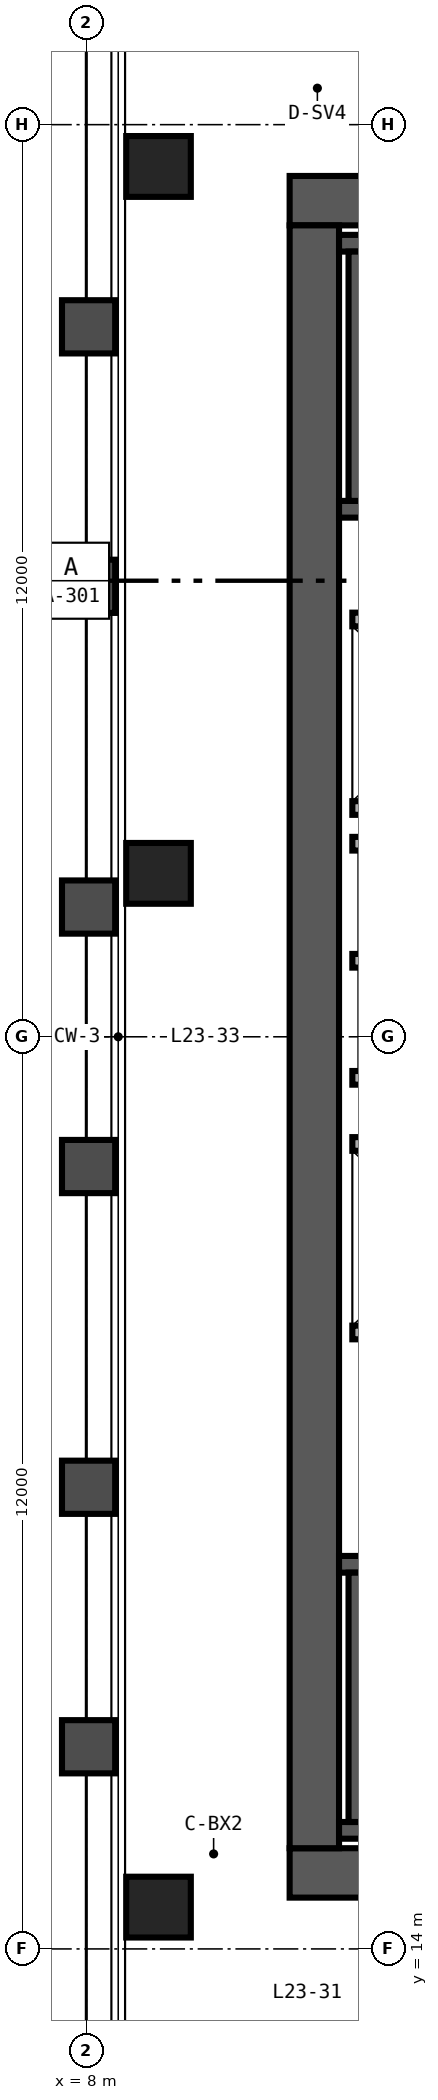
"""IFC4 building model, lengths in metres.
Left out: names, types, materials, properties, quantities, classifications, styles, units other than length and angle.
Written with IfcOpenShell. Run it as: python <this file> out.ifc"""

import sys

from ifc_helpers import new_model, si_unit, direction, frame, frame_2d, origin, origin_2d, place, context, subcontext, project, spatial, rectangle, hollow_rectangle, extrude, source, transform, mapped, element, save


model = new_model("IFC4")
c1 = context("Model", 3, precision=1e-05, world=origin(), true_north=direction((0.0, 1.0)))
c2 = subcontext(c1, "Body", "Model", "MODEL_VIEW")
j1 = project(units=[si_unit("LENGTHUNIT", "METRE"), si_unit("PLANEANGLEUNIT", "RADIAN")], contexts=[c1])
p1 = place(None, origin())
s1 = spatial("IfcSite", under=j1, at=p1, CompositionType="ELEMENT")
p2 = place(p1, origin())
s2 = spatial("IfcBuilding", under=s1, at=p2, CompositionType="ELEMENT")
p3 = place(p2, frame((0.0, 0.0, 97.2)))
s3 = spatial("IfcBuildingStorey", under=s2, at=p3, CompositionType="ELEMENT", Elevation=97.2)
p4 = place(p3, frame((10.675, 15.0, 0.0), z_axis=(0.0, 0.0, 1.0), x_axis=(1.0, 0.0, 0.0)))
e1 = element("IfcWall", 1, at=p4, inside=s3, PredefinedType="SHEAR", context=c2, shape_type="SweptSolid", body=[
    extrude(rectangle(XDim=12.65, YDim=0.65, at=frame_2d((6.325, 0.0))), origin(), (0.0, 0.0, 1.0), 3.36),
])
p5 = place(p4, frame((8.905, 0.0, 0.0)))
e2 = element("IfcOpeningElement", 2, at=p5, cuts=e1, PredefinedType="OPENING", context=c2, shape_type="SweptSolid", body=[
    extrude(rectangle(XDim=1.0, YDim=2.15, at=frame_2d((0.5, 1.075))), frame((0.0, 0.335, 0.0), z_axis=(0.0, -1.0, 0.0), x_axis=(1.0, 0.0, 0.0)), (0.0, 0.0, 1.0), 0.67),
])
p6 = place(p3, frame((10.675, 37.0, 0.0), z_axis=(0.0, 0.0, 1.0), x_axis=(1.0, 0.0, 0.0)))
e3 = element("IfcWall", 3, at=p6, inside=s3, PredefinedType="SHEAR", context=c2, shape_type="SweptSolid", body=[
    extrude(rectangle(XDim=12.65, YDim=0.65, at=frame_2d((6.325, 0.0))), origin(), (0.0, 0.0, 1.0), 3.36),
])
p7 = place(p6, frame((8.905, 0.0, 0.0)))
e4 = element("IfcOpeningElement", 4, at=p7, cuts=e3, PredefinedType="OPENING", context=c2, shape_type="SweptSolid", body=[
    extrude(rectangle(XDim=1.0, YDim=2.15, at=frame_2d((0.5, 1.075))), frame((0.0, 0.335, 0.0), z_axis=(0.0, -1.0, 0.0), x_axis=(1.0, 0.0, 0.0)), (0.0, 0.0, 1.0), 0.67),
])
p8 = place(p3, frame((11.0, 15.325, 0.0), z_axis=(0.0, 0.0, 1.0), x_axis=(0.0, 1.0, 0.0)))
e5 = element("IfcWall", 5, at=p8, inside=s3, PredefinedType="SHEAR", context=c2, shape_type="SweptSolid", body=[
    extrude(rectangle(XDim=21.35, YDim=0.65, at=frame_2d((10.675, 0.0))), origin(), (0.0, 0.0, 1.0), 3.36),
])
p9 = place(p3, frame((11.325, 15.56, 0.0), z_axis=(0.0, 0.0, 1.0), x_axis=(1.0, 0.0, 0.0)))
e6 = element("IfcWall", 6, at=p9, inside=s3, PredefinedType="SHEAR", context=c2, shape_type="SweptSolid", body=[
    extrude(rectangle(XDim=7.985, YDim=0.22, at=frame_2d((3.993, 0.0))), origin(), (0.0, 0.0, 1.0), 3.4),
])
p10 = place(p3, frame((11.325, 19.06, 0.0), z_axis=(0.0, 0.0, 1.0), x_axis=(1.0, 0.0, 0.0)))
e7 = element("IfcWall", 7, at=p10, inside=s3, PredefinedType="SHEAR", context=c2, shape_type="SweptSolid", body=[
    extrude(rectangle(XDim=7.985, YDim=0.22, at=frame_2d((3.993, 0.0))), origin(), (0.0, 0.0, 1.0), 3.4),
])
p11 = place(p10, frame((0.595, 0.0, 0.0)))
e8 = element("IfcOpeningElement", 8, at=p11, cuts=e7, PredefinedType="OPENING", context=c2, shape_type="SweptSolid", body=[
    extrude(rectangle(XDim=1.05, YDim=2.15, at=frame_2d((0.525, 1.075))), frame((0.0, 0.12, 0.0), z_axis=(0.0, -1.0, 0.0), x_axis=(1.0, 0.0, 0.0)), (0.0, 0.0, 1.0), 0.24),
])
p12 = place(p3, frame((11.56, 15.67, 0.0), z_axis=(0.0, 0.0, 1.0), x_axis=(0.0, 1.0, 0.0)))
e9 = element("IfcWall", 9, at=p12, inside=s3, PredefinedType="SHEAR", context=c2, shape_type="SweptSolid", body=[
    extrude(rectangle(XDim=3.28, YDim=0.22, at=frame_2d((1.64, 0.0))), origin(), (0.0, 0.0, 1.0), 3.4),
])
p13 = place(p3, frame((11.325, 32.94, 0.0), z_axis=(0.0, 0.0, 1.0), x_axis=(1.0, 0.0, 0.0)))
e10 = element("IfcWall", 10, at=p13, inside=s3, PredefinedType="SHEAR", context=c2, shape_type="SweptSolid", body=[
    extrude(rectangle(XDim=7.985, YDim=0.22, at=frame_2d((3.993, 0.0))), origin(), (0.0, 0.0, 1.0), 3.4),
])
p14 = place(p13, frame((0.595, 0.0, 0.0)))
e11 = element("IfcOpeningElement", 11, at=p14, cuts=e10, PredefinedType="OPENING", context=c2, shape_type="SweptSolid", body=[
    extrude(rectangle(XDim=1.05, YDim=2.15, at=frame_2d((0.525, 1.075))), frame((0.0, 0.12, 0.0), z_axis=(0.0, -1.0, 0.0), x_axis=(1.0, 0.0, 0.0)), (0.0, 0.0, 1.0), 0.24),
])
p15 = place(p3, frame((11.325, 36.44, 0.0), z_axis=(0.0, 0.0, 1.0), x_axis=(1.0, 0.0, 0.0)))
e12 = element("IfcWall", 12, at=p15, inside=s3, PredefinedType="SHEAR", context=c2, shape_type="SweptSolid", body=[
    extrude(rectangle(XDim=7.985, YDim=0.22, at=frame_2d((3.993, 0.0))), origin(), (0.0, 0.0, 1.0), 3.4),
])
p16 = place(p3, frame((11.56, 33.05, 0.0), z_axis=(0.0, 0.0, 1.0), x_axis=(0.0, 1.0, 0.0)))
e13 = element("IfcWall", 13, at=p16, inside=s3, PredefinedType="SHEAR", context=c2, shape_type="SweptSolid", body=[
    extrude(rectangle(XDim=3.28, YDim=0.22, at=frame_2d((1.64, 0.0))), origin(), (0.0, 0.0, 1.0), 3.4),
])
m1 = source(origin(), c2, "Body", "SweptSolid", [
    extrude(hollow_rectangle(XDim=0.85, YDim=0.8, WallThickness=0.032, at=origin_2d()), origin(), (0.0, 0.0, 1.0), 3.36),
])
for number, where, z_axis, x_axis in (
    (14, (8.95, 14.55, 0.0), (0.0, 0.0, 1.0), (1.0, 0.0, 0.0)),
    (15, (8.95, 28.15, 0.0), (0.0, 0.0, 1.0), (1.0, 0.0, 0.0)),
    (16, (8.95, 37.45, 0.0), (0.0, 0.0, 1.0), (1.0, 0.0, 0.0)),
):
    element("IfcColumn", number, at=place(p3, frame(where, z_axis=z_axis, x_axis=x_axis)), inside=s3, PredefinedType="COLUMN", context=c2, shape_type="MappedRepresentation", body=[
        mapped(m1, transform((0.0, 0.0, 0.0), scale=1.0)),
    ])
for number, where, z_axis, x_axis in (
    (17, (11.5, 22.11, 0.0), (0.0, 0.0, 1.0), (1.0, 0.0, 0.0)),
    (18, (11.5, 24.59, 0.0), (0.0, 0.0, 1.0), (1.0, 0.0, 0.0)),
    (19, (11.5, 29.01, 0.0), (0.0, 0.0, 1.0), (1.0, 0.0, 0.0)),
    (20, (11.5, 31.49, 0.0), (0.0, 0.0, 1.0), (1.0, 0.0, 0.0)),
):
    element("IfcWall", number, at=place(p3, frame(where, z_axis=z_axis, x_axis=x_axis)), inside=s3, PredefinedType="SOLIDWALL", context=c2, shape_type="SweptSolid", body=[
        extrude(rectangle(XDim=2.5, YDim=0.18, at=frame_2d((1.25, 0.0))), origin(), (0.0, 0.0, 1.0), 3.36),
    ])
for number, where, z_axis, x_axis in (
    (21, (11.5, 25.46, 0.0), (0.0, 0.0, 1.0), (1.0, 0.0, 0.0)),
    (22, (11.5, 27.0, 0.0), (0.0, 0.0, 1.0), (1.0, 0.0, 0.0)),
    (23, (11.5, 28.54, 0.0), (0.0, 0.0, 1.0), (1.0, 0.0, 0.0)),
):
    element("IfcWall", number, at=place(p3, frame(where, z_axis=z_axis, x_axis=x_axis)), inside=s3, PredefinedType="SOLIDWALL", context=c2, shape_type="SweptSolid", body=[
        extrude(rectangle(XDim=2.51, YDim=0.18, at=frame_2d((1.255, 0.0))), origin(), (0.0, 0.0, 1.0), 3.36),
    ])
save(model, sys.argv[1])
